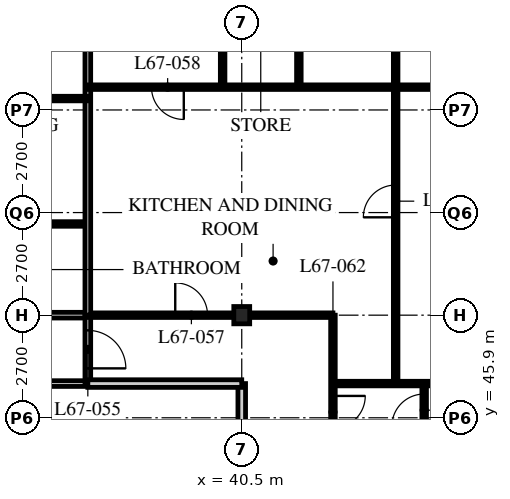
"""IFC4 building model, lengths in metres.
Left out: names, types, materials, properties, quantities, classifications, styles, units other than length and angle.
Written with IfcOpenShell. Run it as: python <this file> out.ifc"""

import sys

from ifc_helpers import new_model, si_unit, direction, frame, frame_2d, origin, origin_2d, place, context, subcontext, project, spatial, rectangle, i_section, extrude, element, fill, save


model = new_model("IFC4")
c1 = context("Model", 3, precision=1e-05, world=origin(), true_north=direction((0.0, 1.0)))
c2 = subcontext(c1, "Body", "Model", "MODEL_VIEW")
j1 = project(units=[si_unit("LENGTHUNIT", "METRE"), si_unit("PLANEANGLEUNIT", "RADIAN")], contexts=[c1])
p1 = place(None, origin())
s1 = spatial("IfcSite", under=j1, at=p1, CompositionType="ELEMENT")
p2 = place(p1, origin())
s2 = spatial("IfcBuilding", under=s1, at=p2, CompositionType="ELEMENT")
p3 = place(p2, frame((0.0, 0.0, 261.9)))
s3 = spatial("IfcBuildingStorey", under=s2, at=p3, CompositionType="ELEMENT", Elevation=261.9)
p4 = place(p3, frame((40.5, 48.6, 0.0), z_axis=(0.0, 0.0, 1.0), x_axis=(1.0, 0.0, 0.0)))
e1 = element("IfcColumn", 1, at=p4, inside=s3, PredefinedType="COLUMN", context=c2, shape_type="SweptSolid", body=[
    extrude(i_section(OverallWidth=0.418, OverallDepth=0.456, WebThickness=0.042, FlangeThickness=0.067, FilletRadius=0.015, at=origin_2d()), origin(), (0.0, 0.0, 1.0), 3.9),
])
p5 = place(p3, frame((8.1, 48.6, 0.0), z_axis=(0.0, 0.0, 1.0), x_axis=(1.0, 0.0, 0.0)))
e2 = element("IfcWall", 2, at=p5, inside=s3, PredefinedType="PARTITIONING", context=c2, shape_type="SweptSolid", body=[
    extrude(rectangle(XDim=28.35, YDim=0.15, at=frame_2d((14.175, 0.0))), origin(), (0.0, 0.0, 1.0), 3.078),
])
p6 = place(p5, frame((4.45, 0.0, 0.0)))
e3 = element("IfcOpeningElement", 3, at=p6, cuts=e2, PredefinedType="OPENING", context=c2, shape_type="SweptSolid", body=[
    extrude(rectangle(XDim=1.0, YDim=2.1, at=frame_2d((0.5, 1.05))), frame((0.0, 0.085, 0.0), z_axis=(0.0, -1.0, 0.0), x_axis=(1.0, 0.0, 0.0)), (0.0, 0.0, 1.0), 0.17),
])
p7 = place(p5, frame((20.65, 0.0, 0.0)))
e4 = element("IfcOpeningElement", 4, at=p7, cuts=e2, PredefinedType="OPENING", context=c2, shape_type="SweptSolid", body=[
    extrude(rectangle(XDim=1.0, YDim=2.1, at=frame_2d((0.5, 1.05))), frame((0.0, 0.085, 0.0), z_axis=(0.0, -1.0, 0.0), x_axis=(1.0, 0.0, 0.0)), (0.0, 0.0, 1.0), 0.17),
])
p8 = place(p5, frame((1.525, 0.0, 0.0)))
e5 = element("IfcOpeningElement", 5, at=p8, cuts=e2, PredefinedType="OPENING", context=c2, shape_type="SweptSolid", body=[
    extrude(rectangle(XDim=1.0, YDim=2.1, at=frame_2d((0.5, 1.05))), frame((0.0, 0.085, 0.0), z_axis=(0.0, -1.0, 0.0), x_axis=(1.0, 0.0, 0.0)), (0.0, 0.0, 1.0), 0.17),
])
p9 = place(p3, frame((29.56, 46.8, 0.0), z_axis=(0.0, 0.0, 1.0), x_axis=(1.0, 0.0, 0.0)))
e6 = element("IfcWall", 6, at=p9, inside=s3, PredefinedType="PARTITIONING", context=c2, shape_type="SweptSolid", body=[
    extrude(rectangle(XDim=6.89, YDim=0.15, at=frame_2d((3.445, 0.0))), origin(), (0.0, 0.0, 1.0), 3.69),
])
p10 = place(p9, frame((0.442, 0.0, 0.0)))
e7 = element("IfcOpeningElement", 7, at=p10, cuts=e6, PredefinedType="OPENING", context=c2, shape_type="SweptSolid", body=[
    extrude(rectangle(XDim=1.0, YDim=2.1, at=frame_2d((0.5, 1.05))), frame((0.0, 0.085, 0.0), z_axis=(0.0, -1.0, 0.0), x_axis=(1.0, 0.0, 0.0)), (0.0, 0.0, 1.0), 0.17),
])
p11 = place(p9, frame((3.642, 0.0, 0.0)))
e8 = element("IfcOpeningElement", 8, at=p11, cuts=e6, PredefinedType="OPENING", context=c2, shape_type="SweptSolid", body=[
    extrude(rectangle(XDim=1.0, YDim=2.1, at=frame_2d((0.5, 1.05))), frame((0.0, 0.085, 0.0), z_axis=(0.0, -1.0, 0.0), x_axis=(1.0, 0.0, 0.0)), (0.0, 0.0, 1.0), 0.17),
])
p12 = place(p3, frame((36.45, 46.8, 0.0), z_axis=(0.0, 0.0, 1.0), x_axis=(0.0, 1.0, 0.0)))
e9 = element("IfcWall", 9, at=p12, inside=s3, PredefinedType="PARTITIONING", context=c2, shape_type="SweptSolid", body=[
    extrude(rectangle(XDim=1.8, YDim=0.15, at=frame_2d((0.9, 0.0))), origin(), (0.0, 0.0, 1.0), 3.69),
])
p13 = place(p12, frame((0.4, 0.0, 0.0)))
e10 = element("IfcOpeningElement", 10, at=p13, cuts=e9, PredefinedType="OPENING", context=c2, shape_type="SweptSolid", body=[
    extrude(rectangle(XDim=1.0, YDim=2.1, at=frame_2d((0.5, 1.05))), frame((0.0, 0.085, 0.0), z_axis=(0.0, -1.0, 0.0), x_axis=(1.0, 0.0, 0.0)), (0.0, 0.0, 1.0), 0.17),
])
p14 = place(p3, frame((40.5, 40.5, 0.0), z_axis=(0.0, 0.0, 1.0), x_axis=(0.0, 1.0, 0.0)))
e11 = element("IfcWall", 11, at=p14, inside=s3, PredefinedType="SOLIDWALL", context=c2, shape_type="SweptSolid", body=[
    extrude(rectangle(XDim=6.3, YDim=0.2, at=frame_2d((3.15, 0.0))), origin(), (0.0, 0.0, 1.0), 3.078),
])
p15 = place(p3, frame((4.1, 51.0, 0.0), z_axis=(0.0, 0.0, 1.0), x_axis=(1.0, 0.0, 0.0)))
e12 = element("IfcWall", 12, at=p15, inside=s3, PredefinedType="PARTITIONING", context=c2, shape_type="SweptSolid", body=[
    extrude(rectangle(XDim=32.35, YDim=0.12, at=frame_2d((16.175, 0.0))), origin(), (0.0, 0.0, 1.0), 3.69),
])
p16 = place(p15, frame((9.025, 0.0, 0.0)))
e13 = element("IfcOpeningElement", 13, at=p16, cuts=e12, PredefinedType="OPENING", context=c2, shape_type="SweptSolid", body=[
    extrude(rectangle(XDim=0.85, YDim=2.1, at=frame_2d((0.425, 1.05))), frame((0.0, 0.07, 0.0), z_axis=(0.0, -1.0, 0.0), x_axis=(1.0, 0.0, 0.0)), (0.0, 0.0, 1.0), 0.14),
])
p17 = place(p15, frame((16.475, 0.0, 0.0)))
e14 = element("IfcOpeningElement", 14, at=p17, cuts=e12, PredefinedType="OPENING", context=c2, shape_type="SweptSolid", body=[
    extrude(rectangle(XDim=0.85, YDim=2.1, at=frame_2d((0.425, 1.05))), frame((0.0, 0.07, 0.0), z_axis=(0.0, -1.0, 0.0), x_axis=(1.0, 0.0, 0.0)), (0.0, 0.0, 1.0), 0.14),
])
p18 = place(p15, frame((20.525, 0.0, 0.0)))
e15 = element("IfcOpeningElement", 15, at=p18, cuts=e12, PredefinedType="OPENING", context=c2, shape_type="SweptSolid", body=[
    extrude(rectangle(XDim=0.85, YDim=2.1, at=frame_2d((0.425, 1.05))), frame((0.0, 0.07, 0.0), z_axis=(0.0, -1.0, 0.0), x_axis=(1.0, 0.0, 0.0)), (0.0, 0.0, 1.0), 0.14),
])
p19 = place(p15, frame((25.225, 0.0, 0.0)))
e16 = element("IfcOpeningElement", 16, at=p19, cuts=e12, PredefinedType="OPENING", context=c2, shape_type="SweptSolid", body=[
    extrude(rectangle(XDim=0.85, YDim=2.1, at=frame_2d((0.425, 1.05))), frame((0.0, 0.07, 0.0), z_axis=(0.0, -1.0, 0.0), x_axis=(1.0, 0.0, 0.0)), (0.0, 0.0, 1.0), 0.14),
])
p20 = place(p15, frame((28.625, 0.0, 0.0)))
e17 = element("IfcOpeningElement", 17, at=p20, cuts=e12, PredefinedType="OPENING", context=c2, shape_type="SweptSolid", body=[
    extrude(rectangle(XDim=0.85, YDim=2.1, at=frame_2d((0.425, 1.05))), frame((0.0, 0.07, 0.0), z_axis=(0.0, -1.0, 0.0), x_axis=(1.0, 0.0, 0.0)), (0.0, 0.0, 1.0), 0.14),
])
p21 = place(p15, frame((6.725, 0.0, 0.0)))
e18 = element("IfcOpeningElement", 18, at=p21, cuts=e12, PredefinedType="OPENING", context=c2, shape_type="SweptSolid", body=[
    extrude(rectangle(XDim=0.85, YDim=2.1, at=frame_2d((0.425, 1.05))), frame((0.0, 0.07, 0.0), z_axis=(0.0, -1.0, 0.0), x_axis=(1.0, 0.0, 0.0)), (0.0, 0.0, 1.0), 0.14),
])
p22 = place(p15, frame((2.875, 0.0, 0.0)))
e19 = element("IfcOpeningElement", 19, at=p22, cuts=e12, PredefinedType="OPENING", context=c2, shape_type="SweptSolid", body=[
    extrude(rectangle(XDim=0.85, YDim=2.1, at=frame_2d((0.425, 1.05))), frame((0.0, 0.07, 0.0), z_axis=(0.0, -1.0, 0.0), x_axis=(1.0, 0.0, 0.0)), (0.0, 0.0, 1.0), 0.14),
])
p23 = place(p3, frame((42.9, 48.6, 0.0), z_axis=(0.0, 0.0, 1.0), x_axis=(0.0, -1.0, 0.0)))
e20 = element("IfcWall", 20, at=p23, inside=s3, PredefinedType="PARTITIONING", context=c2, shape_type="SweptSolid", body=[
    extrude(rectangle(XDim=16.2, YDim=0.12, at=frame_2d((8.1, 0.0))), origin(), (0.0, 0.0, 1.0), 3.69),
])
p24 = place(p23, frame((2.125, 0.0, 0.0)))
e21 = element("IfcOpeningElement", 21, at=p24, cuts=e20, PredefinedType="OPENING", context=c2, shape_type="SweptSolid", body=[
    extrude(rectangle(XDim=0.85, YDim=2.1, at=frame_2d((0.425, 1.05))), frame((0.0, 0.07, 0.0), z_axis=(0.0, -1.0, 0.0), x_axis=(1.0, 0.0, 0.0)), (0.0, 0.0, 1.0), 0.14),
])
p25 = place(p23, frame((8.425, 0.0, 0.0)))
e22 = element("IfcOpeningElement", 22, at=p25, cuts=e20, PredefinedType="OPENING", context=c2, shape_type="SweptSolid", body=[
    extrude(rectangle(XDim=0.85, YDim=2.1, at=frame_2d((0.425, 1.05))), frame((0.0, 0.07, 0.0), z_axis=(0.0, -1.0, 0.0), x_axis=(1.0, 0.0, 0.0)), (0.0, 0.0, 1.0), 0.14),
])
p26 = place(p23, frame((12.475, 0.0, 0.0)))
e23 = element("IfcOpeningElement", 23, at=p26, cuts=e20, PredefinedType="OPENING", context=c2, shape_type="SweptSolid", body=[
    extrude(rectangle(XDim=0.85, YDim=2.1, at=frame_2d((0.425, 1.05))), frame((0.0, 0.07, 0.0), z_axis=(0.0, -1.0, 0.0), x_axis=(1.0, 0.0, 0.0)), (0.0, 0.0, 1.0), 0.14),
])
p27 = place(p3, frame((36.45, 48.6, 0.0), z_axis=(0.0, 0.0, 1.0), x_axis=(1.0, 0.0, 0.0)))
e24 = element("IfcWall", 24, at=p27, inside=s3, PredefinedType="PARTITIONING", context=c2, shape_type="SweptSolid", body=[
    extrude(rectangle(XDim=6.45, YDim=0.12, at=frame_2d((3.225, 0.0))), origin(), (0.0, 0.0, 1.0), 3.078),
])
p28 = place(p27, frame((2.3, 0.0, 0.0)))
e25 = element("IfcOpeningElement", 25, at=p28, cuts=e24, PredefinedType="OPENING", context=c2, shape_type="SweptSolid", body=[
    extrude(rectangle(XDim=0.85, YDim=2.1, at=frame_2d((0.425, 1.05))), frame((0.0, 0.07, 0.0), z_axis=(0.0, -1.0, 0.0), x_axis=(1.0, 0.0, 0.0)), (0.0, 0.0, 1.0), 0.14),
])
p29 = place(p3, frame((36.45, 46.8, 0.0), z_axis=(0.0, 0.0, 1.0), x_axis=(1.0, 0.0, 0.0)))
e26 = element("IfcWall", 26, at=p29, inside=s3, PredefinedType="SOLIDWALL", context=c2, shape_type="SweptSolid", body=[
    extrude(rectangle(XDim=4.05, YDim=0.2, at=frame_2d((2.025, 0.0))), origin(), (0.0, 0.0, 1.0), 3.69),
])
p30 = place(p3, frame((42.9, 46.8, 0.0), z_axis=(0.0, 0.0, 1.0), x_axis=(1.0, 0.0, 0.0)))
e27 = element("IfcWall", 27, at=p30, inside=s3, PredefinedType="PARTITIONING", context=c2, shape_type="SweptSolid", body=[
    extrude(rectangle(XDim=13.5, YDim=0.12, at=frame_2d((6.75, 0.0))), origin(), (0.0, 0.0, 1.0), 3.69),
])
p31 = place(p3, frame((36.45, 64.5, 0.0), z_axis=(0.0, 0.0, 1.0), x_axis=(0.0, -1.0, 0.0)))
e28 = element("IfcWall", 28, at=p31, inside=s3, PredefinedType="PARTITIONING", context=c2, shape_type="SweptSolid", body=[
    extrude(rectangle(XDim=15.9, YDim=0.15, at=frame_2d((7.95, 0.0))), origin(), (0.0, 0.0, 1.0), 3.69),
])
p32 = place(p3, frame((36.45, 54.6, 0.0), z_axis=(0.0, 0.0, 1.0), x_axis=(1.0, 0.0, 0.0)))
e29 = element("IfcWall", 29, at=p32, inside=s3, PredefinedType="PARTITIONING", context=c2, shape_type="SweptSolid", body=[
    extrude(rectangle(XDim=19.95, YDim=0.12, at=frame_2d((9.975, 0.0))), origin(), (0.0, 0.0, 1.0), 3.69),
])
p33 = place(p32, frame((1.675, 0.0, 0.0)))
e30 = element("IfcOpeningElement", 30, at=p33, cuts=e29, PredefinedType="OPENING", context=c2, shape_type="SweptSolid", body=[
    extrude(rectangle(XDim=0.85, YDim=2.1, at=frame_2d((0.425, 1.05))), frame((0.0, 0.07, 0.0), z_axis=(0.0, -1.0, 0.0), x_axis=(1.0, 0.0, 0.0)), (0.0, 0.0, 1.0), 0.14),
])
p34 = place(p3, frame((44.55, 64.5, 0.0), z_axis=(0.0, 0.0, 1.0), x_axis=(0.0, -1.0, 0.0)))
e31 = element("IfcWall", 31, at=p34, inside=s3, PredefinedType="PARTITIONING", context=c2, shape_type="SweptSolid", body=[
    extrude(rectangle(XDim=17.7, YDim=0.12, at=frame_2d((8.85, 0.0))), origin(), (0.0, 0.0, 1.0), 3.69),
])
p35 = place(p34, frame((12.475, 0.0, 0.0)))
e32 = element("IfcOpeningElement", 32, at=p35, cuts=e31, PredefinedType="OPENING", context=c2, shape_type="SweptSolid", body=[
    extrude(rectangle(XDim=0.85, YDim=2.1, at=frame_2d((0.425, 1.05))), frame((0.0, 0.07, 0.0), z_axis=(0.0, -1.0, 0.0), x_axis=(1.0, 0.0, 0.0)), (0.0, 0.0, 1.0), 0.14),
])
p36 = place(p34, frame((4.525, 0.0, 0.0)))
e33 = element("IfcOpeningElement", 33, at=p36, cuts=e31, PredefinedType="OPENING", context=c2, shape_type="SweptSolid", body=[
    extrude(rectangle(XDim=0.85, YDim=2.1, at=frame_2d((0.425, 1.05))), frame((0.0, 0.07, 0.0), z_axis=(0.0, -1.0, 0.0), x_axis=(1.0, 0.0, 0.0)), (0.0, 0.0, 1.0), 0.14),
])
p37 = place(p3, frame((45.3, 46.8, 0.0), z_axis=(0.0, 0.0, 1.0), x_axis=(0.0, -1.0, 0.0)))
e34 = element("IfcWall", 34, at=p37, inside=s3, PredefinedType="PARTITIONING", context=c2, shape_type="SweptSolid", body=[
    extrude(rectangle(XDim=4.01, YDim=0.12, at=frame_2d((2.005, 0.0))), origin(), (0.0, 0.0, 1.0), 3.69),
])
p38 = place(p37, frame((0.275, 0.0, 0.0)))
e35 = element("IfcOpeningElement", 35, at=p38, cuts=e34, PredefinedType="OPENING", context=c2, shape_type="SweptSolid", body=[
    extrude(rectangle(XDim=0.85, YDim=2.1, at=frame_2d((0.425, 1.05))), frame((0.0, 0.07, 0.0), z_axis=(0.0, -1.0, 0.0), x_axis=(1.0, 0.0, 0.0)), (0.0, 0.0, 1.0), 0.14),
])
p39 = place(p3, frame((32.4, 54.3, 0.0), z_axis=(0.0, 0.0, 1.0), x_axis=(1.0, 0.0, 0.0)))
e36 = element("IfcWall", 36, at=p39, inside=s3, PredefinedType="PARTITIONING", context=c2, shape_type="SweptSolid", body=[
    extrude(rectangle(XDim=4.05, YDim=0.12, at=frame_2d((2.025, 0.0))), origin(), (0.0, 0.0, 1.0), 3.69),
])
p40 = place(p39, frame((1.6, 0.0, 0.0)))
e37 = element("IfcOpeningElement", 37, at=p40, cuts=e36, PredefinedType="OPENING", context=c2, shape_type="SweptSolid", body=[
    extrude(rectangle(XDim=0.85, YDim=2.1, at=frame_2d((0.425, 1.05))), frame((0.0, 0.07, 0.0), z_axis=(0.0, -1.0, 0.0), x_axis=(1.0, 0.0, 0.0)), (0.0, 0.0, 1.0), 0.14),
])
for number, where, z_axis, x_axis in (
    (38, (39.997, 54.6, 0.0), (0.0, 0.0, 1.0), (0.0, 1.0, 0.0)),
    (39, (42.003, 54.6, 0.0), (0.0, 0.0, 1.0), (0.0, 1.0, 0.0)),
):
    element("IfcWall", number, at=place(p3, frame(where, z_axis=z_axis, x_axis=x_axis)), inside=s3, PredefinedType="PARTITIONING", context=c2, shape_type="SweptSolid", body=[
        extrude(rectangle(XDim=2.363, YDim=0.12, at=frame_2d((1.181, 0.0))), origin(), (0.0, 0.0, 1.0), 3.69),
    ])
p41 = place(p13, origin())
e40 = element("IfcDoor", 40, at=p41, inside=s3, OperationType="SINGLE_SWING_RIGHT", PredefinedType="DOOR", context=c2, shape_type="SweptSolid", body=[
    extrude(rectangle(XDim=1.0, YDim=2.1, at=frame_2d((0.5, 1.05))), frame((0.0, 0.025, 0.0), z_axis=(0.0, -1.0, 0.0), x_axis=(1.0, 0.0, 0.0)), (0.0, 0.0, 1.0), 0.05),
])
fill(e10, e40)
p42 = place(p28, origin())
e41 = element("IfcDoor", 41, at=p42, inside=s3, OperationType="SINGLE_SWING_LEFT", PredefinedType="DOOR", context=c2, shape_type="SweptSolid", body=[
    extrude(rectangle(XDim=0.85, YDim=2.1, at=frame_2d((0.425, 1.05))), frame((0.0, 0.025, 0.0), z_axis=(0.0, -1.0, 0.0), x_axis=(1.0, 0.0, 0.0)), (0.0, 0.0, 1.0), 0.05),
])
fill(e25, e41)
p43 = place(p33, origin())
e42 = element("IfcDoor", 42, at=p43, inside=s3, OperationType="SINGLE_SWING_LEFT", PredefinedType="DOOR", context=c2, shape_type="SweptSolid", body=[
    extrude(rectangle(XDim=0.85, YDim=2.1, at=frame_2d((0.425, 1.05))), frame((0.0, 0.025, 0.0), z_axis=(0.0, -1.0, 0.0), x_axis=(1.0, 0.0, 0.0)), (0.0, 0.0, 1.0), 0.05),
])
fill(e30, e42)
p44 = place(p35, origin())
e43 = element("IfcDoor", 43, at=p44, inside=s3, OperationType="SINGLE_SWING_LEFT", PredefinedType="DOOR", context=c2, shape_type="SweptSolid", body=[
    extrude(rectangle(XDim=0.85, YDim=2.1, at=frame_2d((0.425, 1.05))), frame((0.0, 0.025, 0.0), z_axis=(0.0, -1.0, 0.0), x_axis=(1.0, 0.0, 0.0)), (0.0, 0.0, 1.0), 0.05),
])
fill(e32, e43)
p45 = place(p24, origin())
e44 = element("IfcDoor", 44, at=p45, inside=s3, OperationType="SINGLE_SWING_LEFT", PredefinedType="DOOR", context=c2, shape_type="SweptSolid", body=[
    extrude(rectangle(XDim=0.85, YDim=2.1, at=frame_2d((0.425, 1.05))), frame((0.0, 0.025, 0.0), z_axis=(0.0, -1.0, 0.0), x_axis=(1.0, 0.0, 0.0)), (0.0, 0.0, 1.0), 0.05),
])
fill(e21, e44)
p46 = place(p38, origin())
e45 = element("IfcDoor", 45, at=p46, inside=s3, OperationType="SINGLE_SWING_LEFT", PredefinedType="DOOR", context=c2, shape_type="SweptSolid", body=[
    extrude(rectangle(XDim=0.85, YDim=2.1, at=frame_2d((0.425, 1.05))), frame((0.0, 0.025, 0.0), z_axis=(0.0, -1.0, 0.0), x_axis=(1.0, 0.0, 0.0)), (0.0, 0.0, 1.0), 0.05),
])
fill(e35, e45)
save(model, sys.argv[1])
